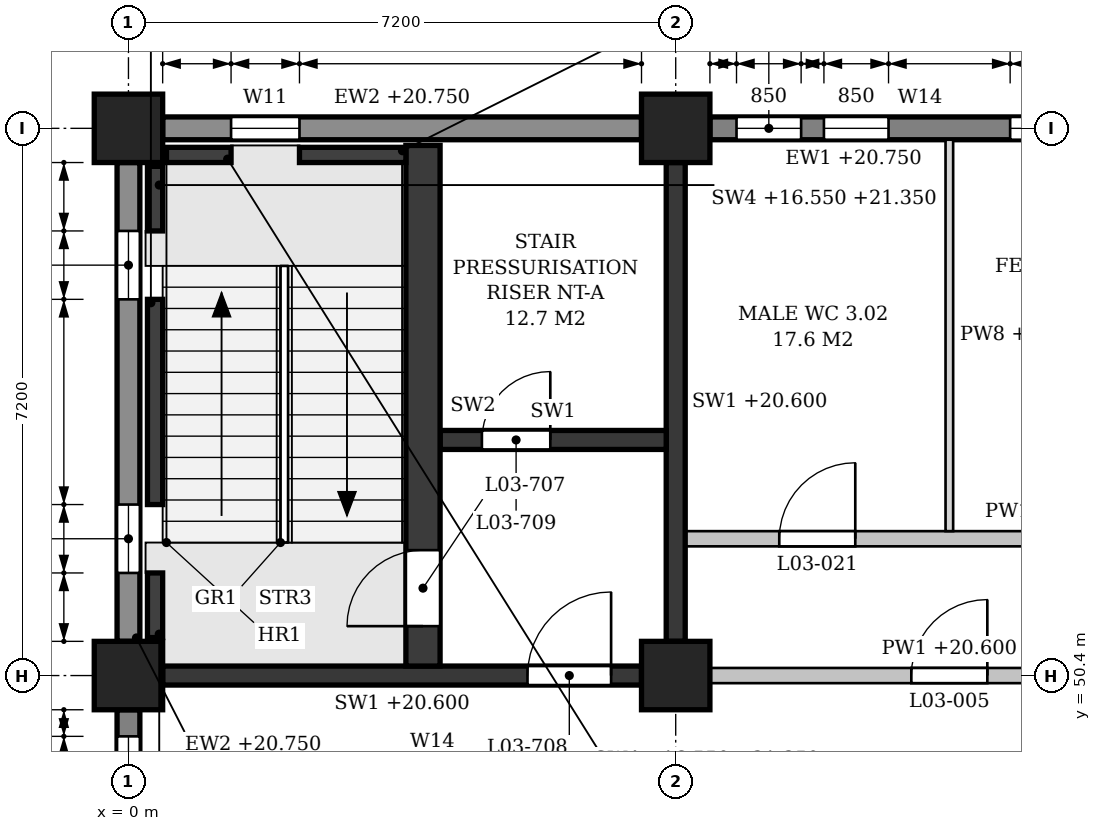
"""IFC4 building model, lengths in metres.
Left out: names, types, materials, properties, quantities, classifications, styles, units other than length and angle.
Written with IfcOpenShell. Run it as: python <this file> out.ifc"""

import sys

from ifc_helpers import new_model, si_unit, direction, frame, frame_2d, origin, origin_2d, place, context, subcontext, project, spatial, polyline, rectangle, outline, extrude, element, fill, save


model = new_model("IFC4")
c1 = context("Model", 3, precision=1e-05, world=origin(), true_north=direction((0.0, 1.0)))
c2 = subcontext(c1, "Body", "Model", "MODEL_VIEW")
j1 = project(units=[si_unit("LENGTHUNIT", "METRE"), si_unit("PLANEANGLEUNIT", "RADIAN")], contexts=[c1])
p1 = place(None, origin())
s1 = spatial("IfcSite", under=j1, at=p1, CompositionType="ELEMENT")
p2 = place(p1, origin())
s2 = spatial("IfcBuilding", under=s1, at=p2, CompositionType="ELEMENT")
p3 = place(p2, frame((0.0, 0.0, 16.8)))
s3 = spatial("IfcBuildingStorey", under=s2, at=p3, CompositionType="ELEMENT", Elevation=16.8)
for number, where, z_axis, x_axis in (
    (1, (0.0, 50.4, 0.0), (0.0, 0.0, 1.0), (1.0, 0.0, 0.0)),
    (2, (0.0, 57.6, 0.0), (0.0, 0.0, 1.0), (1.0, 0.0, 0.0)),
    (3, (7.2, 50.4, 0.0), (0.0, 0.0, 1.0), (1.0, 0.0, 0.0)),
    (4, (7.2, 57.6, 0.0), (0.0, 0.0, 1.0), (1.0, 0.0, 0.0)),
):
    element("IfcColumn", number, at=place(p3, frame(where, z_axis=z_axis, x_axis=x_axis)), inside=s3, PredefinedType="COLUMN", context=c2, shape_type="SweptSolid", body=[
        extrude(rectangle(XDim=0.9, YDim=0.9, at=origin_2d()), origin(), (0.0, 0.0, 1.0), 4.8),
    ])
p4 = place(p3, frame((0.0, 43.65, 0.0), z_axis=(0.0, 0.0, 1.0), x_axis=(0.0, 1.0, 0.0)))
e5 = element("IfcWall", 5, at=p4, inside=s3, PredefinedType="STANDARD", context=c2, shape_type="SweptSolid", body=[
    extrude(rectangle(XDim=6.3, YDim=0.3, at=frame_2d((3.15, 0.0))), origin(), (0.0, 0.0, 1.0), 3.95),
])
p5 = place(p4, frame((0.35, 0.0, 0.9)))
e6 = element("IfcOpeningElement", 6, at=p5, cuts=e5, PredefinedType="OPENING", context=c2, shape_type="SweptSolid", body=[
    extrude(outline(polyline([(0.0, 0.0), (0.85, 0.0), (0.85, 2.05), (0.425, 2.5), (0.0, 2.05), (0.0, 0.0)])), frame((0.0, 0.16, 0.0), z_axis=(0.0, -1.0, 0.0), x_axis=(1.0, 0.0, 0.0)), (0.0, 0.0, 1.0), 0.32),
])
p6 = place(p4, frame((1.5, 0.0, 0.9)))
e7 = element("IfcOpeningElement", 7, at=p6, cuts=e5, PredefinedType="OPENING", context=c2, shape_type="SweptSolid", body=[
    extrude(outline(polyline([(0.0, 0.0), (0.85, 0.0), (0.85, 2.05), (0.425, 2.5), (0.0, 2.05), (0.0, 0.0)])), frame((0.0, 0.16, 0.0), z_axis=(0.0, -1.0, 0.0), x_axis=(1.0, 0.0, 0.0)), (0.0, 0.0, 1.0), 0.32),
])
p7 = place(p4, frame((3.95, 0.0, 0.9)))
e8 = element("IfcOpeningElement", 8, at=p7, cuts=e5, PredefinedType="OPENING", context=c2, shape_type="SweptSolid", body=[
    extrude(outline(polyline([(0.0, 0.0), (0.85, 0.0), (0.85, 2.05), (0.425, 2.5), (0.0, 2.05), (0.0, 0.0)])), frame((0.0, 0.16, 0.0), z_axis=(0.0, -1.0, 0.0), x_axis=(1.0, 0.0, 0.0)), (0.0, 0.0, 1.0), 0.32),
])
p8 = place(p4, frame((5.1, 0.0, 0.9)))
e9 = element("IfcOpeningElement", 9, at=p8, cuts=e5, PredefinedType="OPENING", context=c2, shape_type="SweptSolid", body=[
    extrude(outline(polyline([(0.0, 0.0), (0.85, 0.0), (0.85, 2.05), (0.425, 2.5), (0.0, 2.05), (0.0, 0.0)])), frame((0.0, 0.16, 0.0), z_axis=(0.0, -1.0, 0.0), x_axis=(1.0, 0.0, 0.0)), (0.0, 0.0, 1.0), 0.32),
])
p9 = place(p3, frame((0.0, 50.85, 0.0), z_axis=(0.0, 0.0, 1.0), x_axis=(0.0, 1.0, 0.0)))
e10 = element("IfcWall", 10, at=p9, inside=s3, PredefinedType="STANDARD", context=c2, shape_type="SweptSolid", body=[
    extrude(rectangle(XDim=6.3, YDim=0.3, at=frame_2d((3.15, 0.0))), origin(), (0.0, 0.0, 1.0), 3.95),
])
p10 = place(p9, frame((0.9, 0.0, 0.9)))
e11 = element("IfcOpeningElement", 11, at=p10, cuts=e10, PredefinedType="OPENING", context=c2, shape_type="SweptSolid", body=[
    extrude(outline(polyline([(0.0, 0.0), (0.9, 0.0), (0.9, 2.05), (0.45, 2.5), (0.0, 2.05), (0.0, 0.0)])), frame((0.0, 0.16, 0.0), z_axis=(0.0, -1.0, 0.0), x_axis=(1.0, 0.0, 0.0)), (0.0, 0.0, 1.0), 0.32),
])
p11 = place(p9, frame((4.5, 0.0, 0.9)))
e12 = element("IfcOpeningElement", 12, at=p11, cuts=e10, PredefinedType="OPENING", context=c2, shape_type="SweptSolid", body=[
    extrude(outline(polyline([(0.0, 0.0), (0.9, 0.0), (0.9, 2.05), (0.45, 2.5), (0.0, 2.05), (0.0, 0.0)])), frame((0.0, 0.16, 0.0), z_axis=(0.0, -1.0, 0.0), x_axis=(1.0, 0.0, 0.0)), (0.0, 0.0, 1.0), 0.32),
])
p12 = place(p3, frame((13.95, 57.6, 0.0), z_axis=(0.0, 0.0, 1.0), x_axis=(-1.0, 0.0, 0.0)))
e13 = element("IfcWall", 13, at=p12, inside=s3, PredefinedType="STANDARD", context=c2, shape_type="SweptSolid", body=[
    extrude(rectangle(XDim=6.3, YDim=0.3, at=frame_2d((3.15, 0.0))), origin(), (0.0, 0.0, 1.0), 3.95),
])
p13 = place(p12, frame((0.35, 0.0, 0.9)))
e14 = element("IfcOpeningElement", 14, at=p13, cuts=e13, PredefinedType="OPENING", context=c2, shape_type="SweptSolid", body=[
    extrude(outline(polyline([(0.0, 0.0), (0.85, 0.0), (0.85, 2.05), (0.425, 2.5), (0.0, 2.05), (0.0, 0.0)])), frame((0.0, 0.16, 0.0), z_axis=(0.0, -1.0, 0.0), x_axis=(1.0, 0.0, 0.0)), (0.0, 0.0, 1.0), 0.32),
])
p14 = place(p12, frame((1.5, 0.0, 0.9)))
e15 = element("IfcOpeningElement", 15, at=p14, cuts=e13, PredefinedType="OPENING", context=c2, shape_type="SweptSolid", body=[
    extrude(outline(polyline([(0.0, 0.0), (0.85, 0.0), (0.85, 2.05), (0.425, 2.5), (0.0, 2.05), (0.0, 0.0)])), frame((0.0, 0.16, 0.0), z_axis=(0.0, -1.0, 0.0), x_axis=(1.0, 0.0, 0.0)), (0.0, 0.0, 1.0), 0.32),
])
p15 = place(p12, frame((3.95, 0.0, 0.9)))
e16 = element("IfcOpeningElement", 16, at=p15, cuts=e13, PredefinedType="OPENING", context=c2, shape_type="SweptSolid", body=[
    extrude(outline(polyline([(0.0, 0.0), (0.85, 0.0), (0.85, 2.05), (0.425, 2.5), (0.0, 2.05), (0.0, 0.0)])), frame((0.0, 0.16, 0.0), z_axis=(0.0, -1.0, 0.0), x_axis=(1.0, 0.0, 0.0)), (0.0, 0.0, 1.0), 0.32),
])
p16 = place(p12, frame((5.1, 0.0, 0.9)))
e17 = element("IfcOpeningElement", 17, at=p16, cuts=e13, PredefinedType="OPENING", context=c2, shape_type="SweptSolid", body=[
    extrude(outline(polyline([(0.0, 0.0), (0.85, 0.0), (0.85, 2.05), (0.425, 2.5), (0.0, 2.05), (0.0, 0.0)])), frame((0.0, 0.16, 0.0), z_axis=(0.0, -1.0, 0.0), x_axis=(1.0, 0.0, 0.0)), (0.0, 0.0, 1.0), 0.32),
])
p17 = place(p3, frame((6.75, 57.6, 0.0), z_axis=(0.0, 0.0, 1.0), x_axis=(-1.0, 0.0, 0.0)))
e18 = element("IfcWall", 18, at=p17, inside=s3, PredefinedType="STANDARD", context=c2, shape_type="SweptSolid", body=[
    extrude(rectangle(XDim=6.3, YDim=0.3, at=frame_2d((3.15, 0.0))), origin(), (0.0, 0.0, 1.0), 3.95),
])
p18 = place(p17, frame((4.5, 0.0, 0.9)))
e19 = element("IfcOpeningElement", 19, at=p18, cuts=e18, PredefinedType="OPENING", context=c2, shape_type="SweptSolid", body=[
    extrude(outline(polyline([(0.0, 0.0), (0.9, 0.0), (0.9, 2.05), (0.45, 2.5), (0.0, 2.05), (0.0, 0.0)])), frame((0.0, 0.16, 0.0), z_axis=(0.0, -1.0, 0.0), x_axis=(1.0, 0.0, 0.0)), (0.0, 0.0, 1.0), 0.32),
])
p19 = place(p3, frame((0.45, 50.4, 0.0), z_axis=(0.0, 0.0, 1.0), x_axis=(1.0, 0.0, 0.0)))
e20 = element("IfcWall", 20, at=p19, inside=s3, PredefinedType="SHEAR", context=c2, shape_type="SweptSolid", body=[
    extrude(rectangle(XDim=6.3, YDim=0.25, at=frame_2d((3.15, 0.0))), origin(), (0.0, 0.0, 1.0), 3.8),
])
p20 = place(p19, frame((4.8, 0.0, 0.0)))
e21 = element("IfcOpeningElement", 21, at=p20, cuts=e20, PredefinedType="OPENING", context=c2, shape_type="SweptSolid", body=[
    extrude(rectangle(XDim=1.1, YDim=2.1, at=frame_2d((0.55, 1.05))), frame((0.0, 0.135, 0.0), z_axis=(0.0, -1.0, 0.0), x_axis=(1.0, 0.0, 0.0)), (0.0, 0.0, 1.0), 0.27),
])
p21 = place(p3, frame((7.2, 50.85, 0.0), z_axis=(0.0, 0.0, 1.0), x_axis=(0.0, 1.0, 0.0)))
e22 = element("IfcWall", 22, at=p21, inside=s3, PredefinedType="SHEAR", context=c2, shape_type="SweptSolid", body=[
    extrude(rectangle(XDim=6.3, YDim=0.25, at=frame_2d((3.15, 0.0))), origin(), (0.0, 0.0, 1.0), 3.8),
])
p22 = place(p3, frame((0.35, 50.9, -0.25), z_axis=(0.0, 0.0, 1.0), x_axis=(0.0, 1.0, 0.0)))
e23 = element("IfcWall", 23, at=p22, inside=s3, PredefinedType="SHEAR", context=c2, shape_type="SweptSolid", body=[
    extrude(rectangle(XDim=0.85, YDim=0.2, at=frame_2d((0.425, 0.0))), origin(), (0.0, 0.0, 1.0), 4.8),
])
p23 = place(p3, frame((0.35, 52.65, -0.25), z_axis=(0.0, 0.0, 1.0), x_axis=(0.0, 1.0, 0.0)))
e24 = element("IfcWall", 24, at=p23, inside=s3, PredefinedType="SHEAR", context=c2, shape_type="SweptSolid", body=[
    extrude(rectangle(XDim=2.7, YDim=0.2, at=frame_2d((1.35, 0.0))), origin(), (0.0, 0.0, 1.0), 4.8),
])
for number, where, z_axis, x_axis in (
    (25, (0.35, 56.25, -0.25), (0.0, 0.0, 1.0), (0.0, 1.0, 0.0)),
    (26, (0.5, 57.25, -0.25), (0.0, 0.0, 1.0), (1.0, 0.0, 0.0)),
):
    element("IfcWall", number, at=place(p3, frame(where, z_axis=z_axis, x_axis=x_axis)), inside=s3, PredefinedType="SHEAR", context=c2, shape_type="SweptSolid", body=[
        extrude(rectangle(XDim=0.85, YDim=0.2, at=frame_2d((0.425, 0.0))), origin(), (0.0, 0.0, 1.0), 4.8),
    ])
p24 = place(p3, frame((2.25, 57.25, -0.25), z_axis=(0.0, 0.0, 1.0), x_axis=(1.0, 0.0, 0.0)))
e27 = element("IfcWall", 27, at=p24, inside=s3, PredefinedType="SHEAR", context=c2, shape_type="SweptSolid", body=[
    extrude(rectangle(XDim=1.4, YDim=0.2, at=frame_2d((0.7, 0.0))), origin(), (0.0, 0.0, 1.0), 4.8),
])
p25 = place(p3, frame((3.875, 50.525, 0.0), z_axis=(0.0, 0.0, 1.0), x_axis=(0.0, 1.0, 0.0)))
e28 = element("IfcWall", 28, at=p25, inside=s3, PredefinedType="SHEAR", context=c2, shape_type="SweptSolid", body=[
    extrude(rectangle(XDim=6.85, YDim=0.45, at=frame_2d((3.425, 0.0))), origin(), (0.0, 0.0, 1.0), 4.55),
])
p26 = place(p25, frame((0.525, 0.0, 0.0)))
e29 = element("IfcOpeningElement", 29, at=p26, cuts=e28, PredefinedType="OPENING", context=c2, shape_type="SweptSolid", body=[
    extrude(rectangle(XDim=1.0, YDim=2.1, at=frame_2d((0.5, 1.05))), frame((0.0, 0.235, 0.0), z_axis=(0.0, -1.0, 0.0), x_axis=(1.0, 0.0, 0.0)), (0.0, 0.0, 1.0), 0.47),
])
p27 = place(p3, frame((4.1, 53.5, 0.0), z_axis=(0.0, 0.0, 1.0), x_axis=(1.0, 0.0, 0.0)))
e30 = element("IfcWall", 30, at=p27, inside=s3, PredefinedType="SHEAR", context=c2, shape_type="SweptSolid", body=[
    extrude(rectangle(XDim=2.975, YDim=0.25, at=frame_2d((1.487, 0.0))), origin(), (0.0, 0.0, 1.0), 4.55),
])
p28 = place(p27, frame((0.55, 0.0, 0.0)))
e31 = element("IfcOpeningElement", 31, at=p28, cuts=e30, PredefinedType="OPENING", context=c2, shape_type="SweptSolid", body=[
    extrude(rectangle(XDim=0.9, YDim=2.1, at=frame_2d((0.45, 1.05))), frame((0.0, 0.135, 0.0), z_axis=(0.0, -1.0, 0.0), x_axis=(1.0, 0.0, 0.0)), (0.0, 0.0, 1.0), 0.27),
])
p29 = place(p3, frame((7.65, 50.4, 0.0), z_axis=(0.0, 0.0, 1.0), x_axis=(1.0, 0.0, 0.0)))
e32 = element("IfcWall", 32, at=p29, inside=s3, PredefinedType="PARTITIONING", context=c2, shape_type="SweptSolid", body=[
    extrude(rectangle(XDim=6.3, YDim=0.2, at=frame_2d((3.15, 0.0))), origin(), (0.0, 0.0, 1.0), 3.8),
])
p30 = place(p29, frame((2.65, 0.0, 0.0)))
e33 = element("IfcOpeningElement", 33, at=p30, cuts=e32, PredefinedType="OPENING", context=c2, shape_type="SweptSolid", body=[
    extrude(rectangle(XDim=1.0, YDim=2.1, at=frame_2d((0.5, 1.05))), frame((0.0, 0.11, 0.0), z_axis=(0.0, -1.0, 0.0), x_axis=(1.0, 0.0, 0.0)), (0.0, 0.0, 1.0), 0.22),
])
p31 = place(p3, frame((7.325, 52.2, 0.0), z_axis=(0.0, 0.0, 1.0), x_axis=(1.0, 0.0, 0.0)))
e34 = element("IfcWall", 34, at=p31, inside=s3, PredefinedType="PARTITIONING", context=c2, shape_type="SweptSolid", body=[
    extrude(outline(polyline([(0.0, 0.0), (14.15, 0.0), (14.15, 3.8), (14.025, 3.8), (14.025, 4.55), (7.325, 4.55), (7.325, 3.8), (6.825, 3.8), (6.825, 4.55), (0.125, 4.55), (0.125, 3.8), (0.0, 3.8), (0.0, 0.0)])), frame((0.0, 0.1, 0.0), z_axis=(0.0, -1.0, 0.0), x_axis=(1.0, 0.0, 0.0)), (0.0, 0.0, 1.0), 0.2),
])
p32 = place(p31, frame((1.238, 0.0, 0.0)))
e35 = element("IfcOpeningElement", 35, at=p32, cuts=e34, PredefinedType="OPENING", context=c2, shape_type="SweptSolid", body=[
    extrude(rectangle(XDim=1.0, YDim=2.1, at=frame_2d((0.5, 1.05))), frame((0.0, 0.11, 0.0), z_axis=(0.0, -1.0, 0.0), x_axis=(1.0, 0.0, 0.0)), (0.0, 0.0, 1.0), 0.22),
])
p33 = place(p31, frame((4.775, 0.0, 0.0)))
e36 = element("IfcOpeningElement", 36, at=p33, cuts=e34, PredefinedType="OPENING", context=c2, shape_type="SweptSolid", body=[
    extrude(rectangle(XDim=1.0, YDim=2.1, at=frame_2d((0.5, 1.05))), frame((0.0, 0.11, 0.0), z_axis=(0.0, -1.0, 0.0), x_axis=(1.0, 0.0, 0.0)), (0.0, 0.0, 1.0), 0.22),
])
p34 = place(p31, frame((8.375, 0.0, 0.0)))
e37 = element("IfcOpeningElement", 37, at=p34, cuts=e34, PredefinedType="OPENING", context=c2, shape_type="SweptSolid", body=[
    extrude(rectangle(XDim=1.0, YDim=2.1, at=frame_2d((0.5, 1.05))), frame((0.0, 0.11, 0.0), z_axis=(0.0, -1.0, 0.0), x_axis=(1.0, 0.0, 0.0)), (0.0, 0.0, 1.0), 0.22),
])
p35 = place(p31, frame((11.913, 0.0, 0.0)))
e38 = element("IfcOpeningElement", 38, at=p35, cuts=e34, PredefinedType="OPENING", context=c2, shape_type="SweptSolid", body=[
    extrude(rectangle(XDim=1.0, YDim=2.1, at=frame_2d((0.5, 1.05))), frame((0.0, 0.11, 0.0), z_axis=(0.0, -1.0, 0.0), x_axis=(1.0, 0.0, 0.0)), (0.0, 0.0, 1.0), 0.22),
])
p36 = place(p3, frame((10.8, 52.3, 0.0), z_axis=(0.0, 0.0, 1.0), x_axis=(0.0, 1.0, 0.0)))
e39 = element("IfcWall", 39, at=p36, inside=s3, PredefinedType="PARTITIONING", context=c2, shape_type="SweptSolid", body=[
    extrude(rectangle(XDim=5.15, YDim=0.1, at=frame_2d((2.575, 0.0))), origin(), (0.0, 0.0, 1.0), 3.8),
])
p37 = place(p14, origin())
e40 = element("IfcWindow", 40, at=p37, inside=s3, PartitioningType="SINGLE_PANEL", PredefinedType="WINDOW", context=c2, shape_type="SweptSolid", body=[
    extrude(outline(polyline([(0.0, 0.0), (0.85, 0.0), (0.85, 2.05), (0.425, 2.5), (0.0, 2.05), (0.0, 0.0)])), frame((0.0, 0.03, 0.0), z_axis=(0.0, -1.0, 0.0), x_axis=(1.0, 0.0, 0.0)), (0.0, 0.0, 1.0), 0.06),
])
fill(e15, e40)
p38 = place(p15, origin())
e41 = element("IfcWindow", 41, at=p38, inside=s3, PartitioningType="SINGLE_PANEL", PredefinedType="WINDOW", context=c2, shape_type="SweptSolid", body=[
    extrude(outline(polyline([(0.0, 0.0), (0.85, 0.0), (0.85, 2.05), (0.425, 2.5), (0.0, 2.05), (0.0, 0.0)])), frame((0.0, 0.03, 0.0), z_axis=(0.0, -1.0, 0.0), x_axis=(1.0, 0.0, 0.0)), (0.0, 0.0, 1.0), 0.06),
])
fill(e16, e41)
p39 = place(p16, origin())
e42 = element("IfcWindow", 42, at=p39, inside=s3, PartitioningType="SINGLE_PANEL", PredefinedType="WINDOW", context=c2, shape_type="SweptSolid", body=[
    extrude(outline(polyline([(0.0, 0.0), (0.85, 0.0), (0.85, 2.05), (0.425, 2.5), (0.0, 2.05), (0.0, 0.0)])), frame((0.0, 0.03, 0.0), z_axis=(0.0, -1.0, 0.0), x_axis=(1.0, 0.0, 0.0)), (0.0, 0.0, 1.0), 0.06),
])
fill(e17, e42)
p40 = place(p18, origin())
e43 = element("IfcWindow", 43, at=p40, inside=s3, PartitioningType="SINGLE_PANEL", PredefinedType="WINDOW", context=c2, shape_type="SweptSolid", body=[
    extrude(outline(polyline([(0.0, 0.0), (0.9, 0.0), (0.9, 2.05), (0.45, 2.5), (0.0, 2.05), (0.0, 0.0)])), frame((0.0, 0.03, 0.0), z_axis=(0.0, -1.0, 0.0), x_axis=(1.0, 0.0, 0.0)), (0.0, 0.0, 1.0), 0.06),
])
fill(e19, e43)
p41 = place(p8, origin())
e44 = element("IfcWindow", 44, at=p41, inside=s3, PartitioningType="SINGLE_PANEL", PredefinedType="WINDOW", context=c2, shape_type="SweptSolid", body=[
    extrude(outline(polyline([(0.0, 0.0), (0.85, 0.0), (0.85, 2.05), (0.425, 2.5), (0.0, 2.05), (0.0, 0.0)])), frame((0.0, 0.03, 0.0), z_axis=(0.0, -1.0, 0.0), x_axis=(1.0, 0.0, 0.0)), (0.0, 0.0, 1.0), 0.06),
])
fill(e9, e44)
p42 = place(p10, origin())
e45 = element("IfcWindow", 45, at=p42, inside=s3, PartitioningType="SINGLE_PANEL", PredefinedType="WINDOW", context=c2, shape_type="SweptSolid", body=[
    extrude(outline(polyline([(0.0, 0.0), (0.9, 0.0), (0.9, 2.05), (0.45, 2.5), (0.0, 2.05), (0.0, 0.0)])), frame((0.0, 0.03, 0.0), z_axis=(0.0, -1.0, 0.0), x_axis=(1.0, 0.0, 0.0)), (0.0, 0.0, 1.0), 0.06),
])
fill(e11, e45)
p43 = place(p11, origin())
e46 = element("IfcWindow", 46, at=p43, inside=s3, PartitioningType="SINGLE_PANEL", PredefinedType="WINDOW", context=c2, shape_type="SweptSolid", body=[
    extrude(outline(polyline([(0.0, 0.0), (0.9, 0.0), (0.9, 2.05), (0.45, 2.5), (0.0, 2.05), (0.0, 0.0)])), frame((0.0, 0.03, 0.0), z_axis=(0.0, -1.0, 0.0), x_axis=(1.0, 0.0, 0.0)), (0.0, 0.0, 1.0), 0.06),
])
fill(e12, e46)
p44 = place(p26, origin())
e47 = element("IfcDoor", 47, at=p44, inside=s3, OperationType="SINGLE_SWING_LEFT", PredefinedType="DOOR", context=c2, shape_type="SweptSolid", body=[
    extrude(rectangle(XDim=1.0, YDim=2.1, at=frame_2d((0.5, 1.05))), frame((0.0, 0.025, 0.0), z_axis=(0.0, -1.0, 0.0), x_axis=(1.0, 0.0, 0.0)), (0.0, 0.0, 1.0), 0.05),
])
fill(e29, e47)
p45 = place(p20, origin())
e48 = element("IfcDoor", 48, at=p45, inside=s3, OperationType="SINGLE_SWING_RIGHT", PredefinedType="DOOR", context=c2, shape_type="SweptSolid", body=[
    extrude(rectangle(XDim=1.1, YDim=2.1, at=frame_2d((0.55, 1.05))), frame((0.0, 0.025, 0.0), z_axis=(0.0, -1.0, 0.0), x_axis=(1.0, 0.0, 0.0)), (0.0, 0.0, 1.0), 0.05),
])
fill(e21, e48)
p46 = place(p28, origin())
e49 = element("IfcDoor", 49, at=p46, inside=s3, OperationType="SINGLE_SWING_RIGHT", PredefinedType="DOOR", context=c2, shape_type="SweptSolid", body=[
    extrude(rectangle(XDim=0.9, YDim=2.1, at=frame_2d((0.45, 1.05))), frame((0.0, 0.025, 0.0), z_axis=(0.0, -1.0, 0.0), x_axis=(1.0, 0.0, 0.0)), (0.0, 0.0, 1.0), 0.05),
])
fill(e31, e49)
p47 = place(p30, origin())
e50 = element("IfcDoor", 50, at=p47, inside=s3, OperationType="SINGLE_SWING_RIGHT", PredefinedType="DOOR", context=c2, shape_type="SweptSolid", body=[
    extrude(rectangle(XDim=1.0, YDim=2.1, at=frame_2d((0.5, 1.05))), frame((0.0, 0.025, 0.0), z_axis=(0.0, -1.0, 0.0), x_axis=(1.0, 0.0, 0.0)), (0.0, 0.0, 1.0), 0.05),
])
fill(e33, e50)
p48 = place(p32, origin())
e51 = element("IfcDoor", 51, at=p48, inside=s3, OperationType="SINGLE_SWING_RIGHT", PredefinedType="DOOR", context=c2, shape_type="SweptSolid", body=[
    extrude(rectangle(XDim=1.0, YDim=2.1, at=frame_2d((0.5, 1.05))), frame((0.0, 0.025, 0.0), z_axis=(0.0, -1.0, 0.0), x_axis=(1.0, 0.0, 0.0)), (0.0, 0.0, 1.0), 0.05),
])
fill(e35, e51)
save(model, sys.argv[1])
